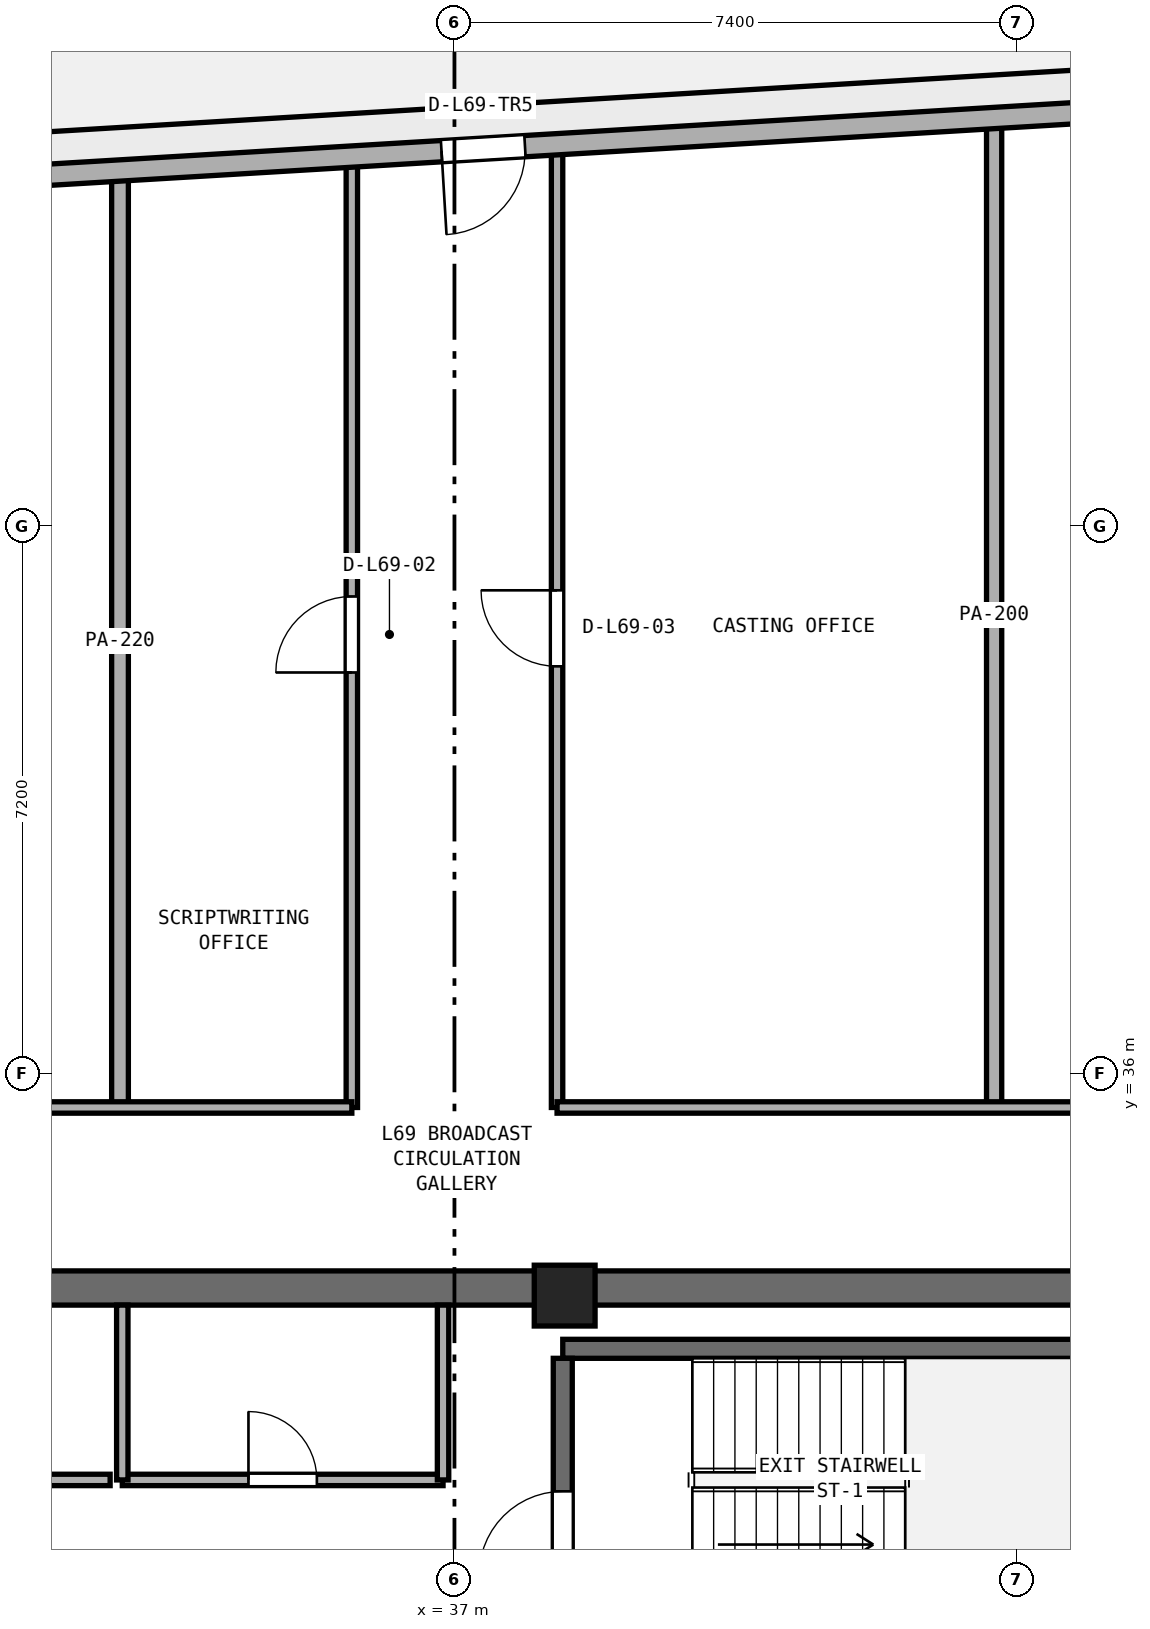
"""IFC4 building model, lengths in metres.
Left out: names, types, materials, properties, quantities, classifications, styles, units other than length and angle.
Written with IfcOpenShell. Run it as: python <this file> out.ifc"""

import sys

from ifc_helpers import new_model, si_unit, direction, frame, frame_2d, origin, origin_2d, place, context, subcontext, project, spatial, rectangle, extrude, element, fill, save


model = new_model("IFC4")
c1 = context("Model", 3, precision=1e-05, world=origin(), true_north=direction((0.0, 1.0)))
c2 = subcontext(c1, "Body", "Model", "MODEL_VIEW")
j1 = project(units=[si_unit("LENGTHUNIT", "METRE"), si_unit("PLANEANGLEUNIT", "RADIAN")], contexts=[c1])
p1 = place(None, origin())
s1 = spatial("IfcSite", under=j1, at=p1, CompositionType="ELEMENT")
p2 = place(p1, origin())
s2 = spatial("IfcBuilding", under=s1, at=p2, CompositionType="ELEMENT")
p3 = place(p2, frame((0.0, 0.0, 270.6)))
s3 = spatial("IfcBuildingStorey", under=s2, at=p3, CompositionType="ELEMENT", Elevation=270.6)
p4 = place(p3, frame((25.4, 33.175, 0.0), z_axis=(0.0, 0.0, 1.0), x_axis=(1.0, 0.0, 0.0)))
e1 = element("IfcWall", 1, at=p4, inside=s3, PredefinedType="SHEAR", context=c2, shape_type="SweptSolid", body=[
    extrude(rectangle(XDim=23.2, YDim=0.45, at=frame_2d((11.6, 0.0))), origin(), (0.0, 0.0, 1.0), 3.54),
])
p5 = place(p3, frame((38.45, 33.075, 0.0), z_axis=(0.0, 0.0, 1.0), x_axis=(1.0, 0.0, 0.0)))
e2 = element("IfcColumn", 2, at=p5, inside=s3, PredefinedType="PILASTER", context=c2, shape_type="SweptSolid", body=[
    extrude(rectangle(XDim=0.8, YDim=0.8, at=origin_2d()), origin(), (0.0, 0.0, 1.0), 3.8),
])
p6 = place(p3, frame((38.425, 32.375, 0.0), z_axis=(0.0, 0.0, 1.0), x_axis=(1.0, 0.0, 0.0)))
e3 = element("IfcWall", 3, at=p6, inside=s3, PredefinedType="SHEAR", context=c2, shape_type="SweptSolid", body=[
    extrude(rectangle(XDim=7.3, YDim=0.25, at=frame_2d((3.65, 0.0))), origin(), (0.0, 0.0, 1.0), 3.54),
])
p7 = place(p3, frame((38.425, 29.05, 0.0), z_axis=(0.0, 0.0, 1.0), x_axis=(0.0, 1.0, 0.0)))
e4 = element("IfcWall", 4, at=p7, inside=s3, PredefinedType="SHEAR", context=c2, shape_type="SweptSolid", body=[
    extrude(rectangle(XDim=3.2, YDim=0.25, at=frame_2d((1.6, 0.0))), origin(), (0.0, 0.0, 1.0), 3.54),
])
p8 = place(p7, frame((0.35, 0.0, 0.0)))
e5 = element("IfcOpeningElement", 5, at=p8, cuts=e4, PredefinedType="OPENING", context=c2, shape_type="SweptSolid", body=[
    extrude(rectangle(XDim=1.1, YDim=2.15, at=frame_2d((0.55, 1.075))), frame((0.0, 0.135, 0.0), z_axis=(0.0, -1.0, 0.0), x_axis=(1.0, 0.0, 0.0)), (0.0, 0.0, 1.0), 0.27),
])
p9 = place(p3, frame((29.28, 30.65, 0.0), z_axis=(0.0, 0.0, 1.0), x_axis=(1.0, 0.0, 0.0)))
e6 = element("IfcWall", 6, at=p9, inside=s3, PredefinedType="PARTITIONING", context=c2, shape_type="SweptSolid", body=[
    extrude(rectangle(XDim=3.19, YDim=0.15, at=frame_2d((1.595, 0.0))), origin(), (0.0, 0.0, 1.0), 3.54),
])
p10 = place(p9, frame((1.12, 0.0, 0.0)))
e7 = element("IfcOpeningElement", 7, at=p10, cuts=e6, PredefinedType="OPENING", context=c2, shape_type="SweptSolid", body=[
    extrude(rectangle(XDim=0.95, YDim=2.1, at=frame_2d((0.475, 1.05))), frame((0.0, 0.085, 0.0), z_axis=(0.0, -1.0, 0.0), x_axis=(1.0, 0.0, 0.0)), (0.0, 0.0, 1.0), 0.17),
])
p11 = place(p3, frame((32.63, 30.65, 0.0), z_axis=(0.0, 0.0, 1.0), x_axis=(1.0, 0.0, 0.0)))
e8 = element("IfcWall", 8, at=p11, inside=s3, PredefinedType="PARTITIONING", context=c2, shape_type="SweptSolid", body=[
    extrude(rectangle(XDim=4.22, YDim=0.15, at=frame_2d((2.11, 0.0))), origin(), (0.0, 0.0, 1.0), 3.54),
])
p12 = place(p11, frame((1.66, 0.0, 0.0)))
e9 = element("IfcOpeningElement", 9, at=p12, cuts=e8, PredefinedType="OPENING", context=c2, shape_type="SweptSolid", body=[
    extrude(rectangle(XDim=0.9, YDim=2.1, at=frame_2d((0.45, 1.05))), frame((0.0, 0.085, 0.0), z_axis=(0.0, -1.0, 0.0), x_axis=(1.0, 0.0, 0.0)), (0.0, 0.0, 1.0), 0.17),
])
for number, where, z_axis, x_axis in (
    (10, (32.63, 30.65, 0.0), (0.0, 0.0, 1.0), (0.0, 1.0, 0.0)),
    (11, (36.85, 30.65, 0.0), (0.0, 0.0, 1.0), (0.0, 1.0, 0.0)),
):
    element("IfcWall", number, at=place(p3, frame(where, z_axis=z_axis, x_axis=x_axis)), inside=s3, PredefinedType="PARTITIONING", context=c2, shape_type="SweptSolid", body=[
        extrude(rectangle(XDim=2.3, YDim=0.15, at=frame_2d((1.15, 0.0))), origin(), (0.0, 0.0, 1.0), 3.54),
    ])
p13 = place(p3, frame((44.1, 35.55, 0.0), z_axis=(0.0, 0.0, 1.0), x_axis=(0.0, 1.0, 0.0)))
e12 = element("IfcWall", 12, at=p13, inside=s3, PredefinedType="PARTITIONING", context=c2, shape_type="SweptSolid", body=[
    extrude(rectangle(XDim=12.953, YDim=0.2, at=frame_2d((6.476, 0.0))), origin(), (0.0, 0.0, 1.0), 3.54),
])
p14 = place(p3, frame((38.35, 35.55, 0.0), z_axis=(0.0, 0.0, 1.0), x_axis=(0.0, 1.0, 0.0)))
e13 = element("IfcWall", 13, at=p14, inside=s3, PredefinedType="PARTITIONING", context=c2, shape_type="SweptSolid", body=[
    extrude(rectangle(XDim=12.607, YDim=0.15, at=frame_2d((6.304, 0.0))), origin(), (0.0, 0.0, 1.0), 3.54),
])
p15 = place(p14, frame((5.804, 0.0, 0.0)))
e14 = element("IfcOpeningElement", 14, at=p15, cuts=e13, PredefinedType="OPENING", context=c2, shape_type="SweptSolid", body=[
    extrude(rectangle(XDim=1.0, YDim=2.12, at=frame_2d((0.5, 1.06))), frame((0.0, 0.085, 0.0), z_axis=(0.0, -1.0, 0.0), x_axis=(1.0, 0.0, 0.0)), (0.0, 0.0, 1.0), 0.17),
])
p16 = place(p3, frame((35.65, 35.55, 0.0), z_axis=(0.0, 0.0, 1.0), x_axis=(0.0, 1.0, 0.0)))
e15 = element("IfcWall", 15, at=p16, inside=s3, PredefinedType="PARTITIONING", context=c2, shape_type="SweptSolid", body=[
    extrude(rectangle(XDim=12.445, YDim=0.15, at=frame_2d((6.223, 0.0))), origin(), (0.0, 0.0, 1.0), 3.54),
])
p17 = place(p16, frame((5.723, 0.0, 0.0)))
e16 = element("IfcOpeningElement", 16, at=p17, cuts=e15, PredefinedType="OPENING", context=c2, shape_type="SweptSolid", body=[
    extrude(rectangle(XDim=1.0, YDim=2.12, at=frame_2d((0.5, 1.06))), frame((0.0, 0.085, 0.0), z_axis=(0.0, -1.0, 0.0), x_axis=(1.0, 0.0, 0.0)), (0.0, 0.0, 1.0), 0.17),
])
p18 = place(p3, frame((32.6, 35.55, 0.0), z_axis=(0.0, 0.0, 1.0), x_axis=(0.0, 1.0, 0.0)))
e17 = element("IfcWall", 17, at=p18, inside=s3, PredefinedType="PARTITIONING", context=c2, shape_type="SweptSolid", body=[
    extrude(rectangle(XDim=12.262, YDim=0.22, at=frame_2d((6.131, 0.0))), origin(), (0.0, 0.0, 1.0), 3.54),
])
p19 = place(p3, frame((23.25, 35.55, 0.0), z_axis=(0.0, 0.0, 1.0), x_axis=(1.0, 0.0, 0.0)))
e18 = element("IfcWall", 18, at=p19, inside=s3, PredefinedType="PARTITIONING", context=c2, shape_type="SweptSolid", body=[
    extrude(rectangle(XDim=12.4, YDim=0.15, at=frame_2d((6.2, 0.0))), origin(), (0.0, 0.0, 1.0), 3.54),
])
p20 = place(p19, frame((4.295, 0.0, 0.0)))
e19 = element("IfcOpeningElement", 19, at=p20, cuts=e18, PredefinedType="OPENING", context=c2, shape_type="SweptSolid", body=[
    extrude(rectangle(XDim=1.0, YDim=2.12, at=frame_2d((0.5, 1.06))), frame((0.0, 0.085, 0.0), z_axis=(0.0, -1.0, 0.0), x_axis=(1.0, 0.0, 0.0)), (0.0, 0.0, 1.0), 0.17),
])
p21 = place(p3, frame((38.35, 35.55, 0.0), z_axis=(0.0, 0.0, 1.0), x_axis=(1.0, 0.0, 0.0)))
e20 = element("IfcWall", 20, at=p21, inside=s3, PredefinedType="PARTITIONING", context=c2, shape_type="SweptSolid", body=[
    extrude(rectangle(XDim=12.4, YDim=0.15, at=frame_2d((6.2, 0.0))), origin(), (0.0, 0.0, 1.0), 3.54),
])
p22 = place(p21, frame((8.505, 0.0, 0.0)))
e21 = element("IfcOpeningElement", 21, at=p22, cuts=e20, PredefinedType="OPENING", context=c2, shape_type="SweptSolid", body=[
    extrude(rectangle(XDim=0.9, YDim=2.1, at=frame_2d((0.45, 1.05))), frame((0.0, 0.085, 0.0), z_axis=(0.0, -1.0, 0.0), x_axis=(1.0, 0.0, 0.0)), (0.0, 0.0, 1.0), 0.17),
])
p23 = place(p3, frame((47.566, 48.775, 0.0), z_axis=(0.0, 0.0, 1.0), x_axis=(-0.998202767485, -0.059926913695, 0.0)))
e22 = element("IfcWall", 22, at=p23, inside=s3, PredefinedType="STANDARD", context=c2, shape_type="SweptSolid", body=[
    extrude(rectangle(XDim=19.111, YDim=0.28, at=frame_2d((9.556, 0.0))), origin(), (0.0, 0.0, 1.0), 3.54),
])
p24 = place(p23, frame((9.656, 0.0, 0.0)))
e23 = element("IfcOpeningElement", 23, at=p24, cuts=e22, PredefinedType="OPENING", context=c2, shape_type="SweptSolid", body=[
    extrude(rectangle(XDim=1.1, YDim=2.2, at=frame_2d((0.55, 1.1))), frame((0.0, 0.15, 0.0), z_axis=(0.0, -1.0, 0.0), x_axis=(1.0, 0.0, 0.0)), (0.0, 0.0, 1.0), 0.3),
])
p25 = place(p8, origin())
e24 = element("IfcDoor", 24, at=p25, inside=s3, OperationType="SINGLE_SWING_LEFT", PredefinedType="DOOR", context=c2, shape_type="SweptSolid", body=[
    extrude(rectangle(XDim=1.1, YDim=2.15, at=frame_2d((0.55, 1.075))), frame((0.0, 0.025, 0.0), z_axis=(0.0, -1.0, 0.0), x_axis=(1.0, 0.0, 0.0)), (0.0, 0.0, 1.0), 0.05),
])
fill(e5, e24)
p26 = place(p12, origin())
e25 = element("IfcDoor", 25, at=p26, inside=s3, OperationType="SINGLE_SWING_LEFT", PredefinedType="DOOR", context=c2, shape_type="SweptSolid", body=[
    extrude(rectangle(XDim=0.9, YDim=2.1, at=frame_2d((0.45, 1.05))), frame((0.0, 0.025, 0.0), z_axis=(0.0, -1.0, 0.0), x_axis=(1.0, 0.0, 0.0)), (0.0, 0.0, 1.0), 0.05),
])
fill(e9, e25)
p27 = place(p17, origin())
e26 = element("IfcDoor", 26, at=p27, inside=s3, OperationType="SINGLE_SWING_LEFT", PredefinedType="DOOR", context=c2, shape_type="SweptSolid", body=[
    extrude(rectangle(XDim=1.0, YDim=2.12, at=frame_2d((0.5, 1.06))), frame((0.0, 0.025, 0.0), z_axis=(0.0, -1.0, 0.0), x_axis=(1.0, 0.0, 0.0)), (0.0, 0.0, 1.0), 0.05),
])
fill(e16, e26)
p28 = place(p15, origin())
e27 = element("IfcDoor", 27, at=p28, inside=s3, OperationType="SINGLE_SWING_RIGHT", PredefinedType="DOOR", context=c2, shape_type="SweptSolid", body=[
    extrude(rectangle(XDim=1.0, YDim=2.12, at=frame_2d((0.5, 1.06))), frame((0.0, 0.025, 0.0), z_axis=(0.0, -1.0, 0.0), x_axis=(1.0, 0.0, 0.0)), (0.0, 0.0, 1.0), 0.05),
])
fill(e14, e27)
p29 = place(p24, origin())
e28 = element("IfcDoor", 28, at=p29, inside=s3, OperationType="SINGLE_SWING_RIGHT", PredefinedType="DOOR", context=c2, shape_type="SweptSolid", body=[
    extrude(rectangle(XDim=1.1, YDim=2.2, at=frame_2d((0.55, 1.1))), frame((0.0, 0.025, 0.0), z_axis=(0.0, -1.0, 0.0), x_axis=(1.0, 0.0, 0.0)), (0.0, 0.0, 1.0), 0.05),
])
fill(e23, e28)
save(model, sys.argv[1])
